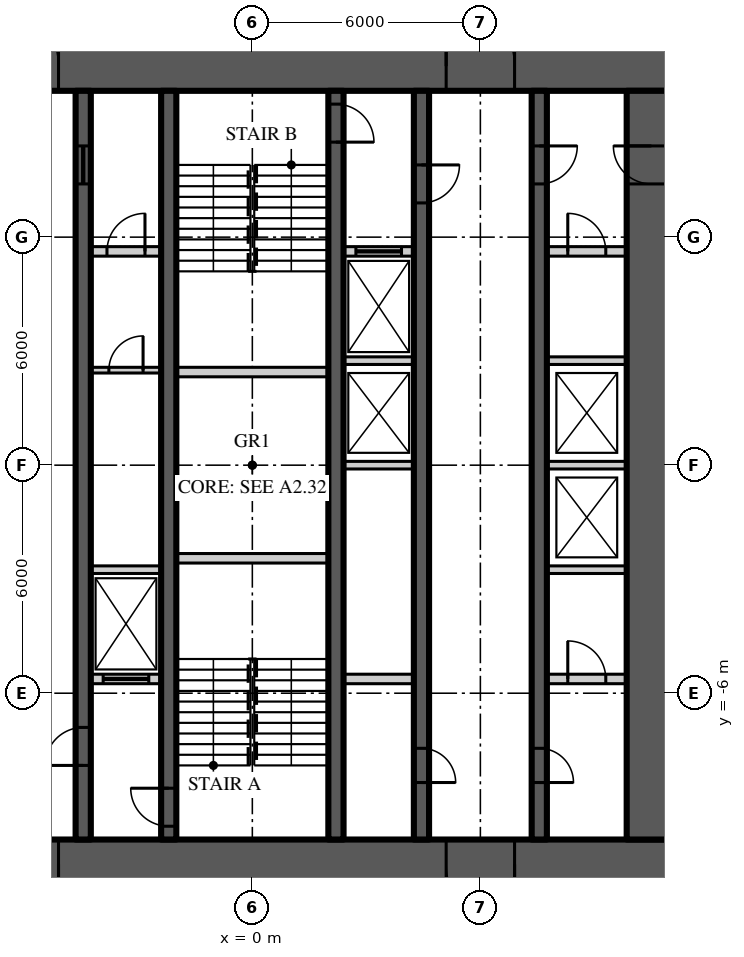
"""IFC4 building model, lengths in metres.
Left out: names, types, materials, properties, quantities, classifications, styles, units other than length and angle.
Written with IfcOpenShell. Run it as: python <this file> out.ifc"""

import sys

from ifc_helpers import new_model, si_unit, direction, frame, frame_2d, origin, place, context, subcontext, project, spatial, rectangle, extrude, element, fill, save


model = new_model("IFC4")
c1 = context("Model", 3, precision=1e-05, world=origin(), true_north=direction((0.0, 1.0)))
c2 = subcontext(c1, "Body", "Model", "MODEL_VIEW")
j1 = project(units=[si_unit("LENGTHUNIT", "METRE"), si_unit("PLANEANGLEUNIT", "RADIAN")], contexts=[c1])
p1 = place(None, origin())
s1 = spatial("IfcSite", under=j1, at=p1, CompositionType="ELEMENT")
p2 = place(p1, origin())
s2 = spatial("IfcBuilding", under=s1, at=p2, CompositionType="ELEMENT")
p3 = place(p2, frame((0.0, 0.0, 243.9)))
s3 = spatial("IfcBuildingStorey", under=s2, at=p3, CompositionType="ELEMENT", Elevation=243.9)
p4 = place(p3, frame((-11.15, 10.5, 0.0), z_axis=(0.0, 0.0, 1.0), x_axis=(1.0, 0.0, 0.0)))
e1 = element("IfcWall", 1, at=p4, inside=s3, PredefinedType="SHEAR", context=c2, shape_type="SweptSolid", body=[
    extrude(rectangle(XDim=22.3, YDim=1.3, at=frame_2d((11.15, 0.0))), origin(), (0.0, 0.0, 1.0), 3.9),
])
p5 = place(p4, frame((4.25, 0.0, 0.0)))
e2 = element("IfcOpeningElement", 2, at=p5, cuts=e1, PredefinedType="OPENING", context=c2, shape_type="SweptSolid", body=[
    extrude(rectangle(XDim=1.8, YDim=2.2, at=frame_2d((0.9, 1.1))), frame((0.0, 0.66, 0.0), z_axis=(0.0, -1.0, 0.0), x_axis=(1.0, 0.0, 0.0)), (0.0, 0.0, 1.0), 1.32),
])
p6 = place(p4, frame((16.25, 0.0, 0.0)))
e3 = element("IfcOpeningElement", 3, at=p6, cuts=e1, PredefinedType="OPENING", context=c2, shape_type="SweptSolid", body=[
    extrude(rectangle(XDim=1.8, YDim=2.2, at=frame_2d((0.9, 1.1))), frame((0.0, 0.66, 0.0), z_axis=(0.0, -1.0, 0.0), x_axis=(1.0, 0.0, 0.0)), (0.0, 0.0, 1.0), 1.32),
])
p7 = place(p3, frame((11.15, -10.5, 0.0), z_axis=(0.0, 0.0, 1.0), x_axis=(-1.0, 0.0, 0.0)))
e4 = element("IfcWall", 4, at=p7, inside=s3, PredefinedType="SHEAR", context=c2, shape_type="SweptSolid", body=[
    extrude(rectangle(XDim=22.3, YDim=1.3, at=frame_2d((11.15, 0.0))), origin(), (0.0, 0.0, 1.0), 3.9),
])
p8 = place(p7, frame((16.25, 0.0, 0.0)))
e5 = element("IfcOpeningElement", 5, at=p8, cuts=e4, PredefinedType="OPENING", context=c2, shape_type="SweptSolid", body=[
    extrude(rectangle(XDim=1.8, YDim=2.2, at=frame_2d((0.9, 1.1))), frame((0.0, 0.66, 0.0), z_axis=(0.0, -1.0, 0.0), x_axis=(1.0, 0.0, 0.0)), (0.0, 0.0, 1.0), 1.32),
])
p9 = place(p7, frame((4.25, 0.0, 0.0)))
e6 = element("IfcOpeningElement", 6, at=p9, cuts=e4, PredefinedType="OPENING", context=c2, shape_type="SweptSolid", body=[
    extrude(rectangle(XDim=1.8, YDim=2.2, at=frame_2d((0.9, 1.1))), frame((0.0, 0.66, 0.0), z_axis=(0.0, -1.0, 0.0), x_axis=(1.0, 0.0, 0.0)), (0.0, 0.0, 1.0), 1.32),
])
p10 = place(p3, frame((10.5, -9.85, 0.0), z_axis=(0.0, 0.0, 1.0), x_axis=(0.0, 1.0, 0.0)))
e7 = element("IfcWall", 7, at=p10, inside=s3, PredefinedType="SHEAR", context=c2, shape_type="SweptSolid", body=[
    extrude(rectangle(XDim=19.7, YDim=1.3, at=frame_2d((9.85, 0.0))), origin(), (0.0, 0.0, 1.0), 3.9),
])
p11 = place(p10, frame((17.25, 0.0, 0.0)))
e8 = element("IfcOpeningElement", 8, at=p11, cuts=e7, PredefinedType="OPENING", context=c2, shape_type="SweptSolid", body=[
    extrude(rectangle(XDim=1.0, YDim=2.2, at=frame_2d((0.5, 1.1))), frame((0.0, 0.66, 0.0), z_axis=(0.0, -1.0, 0.0), x_axis=(1.0, 0.0, 0.0)), (0.0, 0.0, 1.0), 1.32),
])
p12 = place(p3, frame((7.55, 9.85, 0.0), z_axis=(0.0, 0.0, 1.0), x_axis=(0.0, -1.0, 0.0)))
e9 = element("IfcWall", 9, at=p12, inside=s3, PredefinedType="SHEAR", context=c2, shape_type="SweptSolid", body=[
    extrude(rectangle(XDim=19.7, YDim=0.4, at=frame_2d((9.85, 0.0))), origin(), (0.0, 0.0, 1.0), 3.9),
])
p13 = place(p12, frame((1.45, 0.0, 0.0)))
e10 = element("IfcOpeningElement", 10, at=p13, cuts=e9, PredefinedType="OPENING", context=c2, shape_type="SweptSolid", body=[
    extrude(rectangle(XDim=1.0, YDim=2.2, at=frame_2d((0.5, 1.1))), frame((0.0, 0.21, 0.0), z_axis=(0.0, -1.0, 0.0), x_axis=(1.0, 0.0, 0.0)), (0.0, 0.0, 1.0), 0.42),
])
p14 = place(p12, frame((17.3, 0.0, 0.0)))
e11 = element("IfcOpeningElement", 11, at=p14, cuts=e9, PredefinedType="OPENING", context=c2, shape_type="SweptSolid", body=[
    extrude(rectangle(XDim=0.9, YDim=2.1, at=frame_2d((0.45, 1.05))), frame((0.0, 0.21, 0.0), z_axis=(0.0, -1.0, 0.0), x_axis=(1.0, 0.0, 0.0)), (0.0, 0.0, 1.0), 0.42),
])
p15 = place(p3, frame((-4.45, -9.85, 0.0), z_axis=(0.0, 0.0, 1.0), x_axis=(0.0, 1.0, 0.0)))
e12 = element("IfcWall", 12, at=p15, inside=s3, PredefinedType="SHEAR", context=c2, shape_type="SweptSolid", body=[
    extrude(rectangle(XDim=19.7, YDim=0.4, at=frame_2d((9.85, 0.0))), origin(), (0.0, 0.0, 1.0), 3.9),
])
p16 = place(p15, frame((1.95, 0.0, 0.0)))
e13 = element("IfcOpeningElement", 13, at=p16, cuts=e12, PredefinedType="OPENING", context=c2, shape_type="SweptSolid", body=[
    extrude(rectangle(XDim=1.0, YDim=2.2, at=frame_2d((0.5, 1.1))), frame((0.0, 0.21, 0.0), z_axis=(0.0, -1.0, 0.0), x_axis=(1.0, 0.0, 0.0)), (0.0, 0.0, 1.0), 0.42),
])
p17 = place(p15, frame((17.25, 0.0, 0.0)))
e14 = element("IfcOpeningElement", 14, at=p17, cuts=e12, PredefinedType="OPENING", context=c2, shape_type="SweptSolid", body=[
    extrude(rectangle(XDim=1.0, YDim=2.1, at=frame_2d((0.5, 1.05))), frame((0.0, 0.21, 0.0), z_axis=(0.0, -1.0, 0.0), x_axis=(1.0, 0.0, 0.0)), (0.0, 0.0, 1.0), 0.42),
])
p18 = place(p3, frame((4.45, 9.85, 0.0), z_axis=(0.0, 0.0, 1.0), x_axis=(0.0, -1.0, 0.0)))
e15 = element("IfcWall", 15, at=p18, inside=s3, PredefinedType="SHEAR", context=c2, shape_type="SweptSolid", body=[
    extrude(rectangle(XDim=19.7, YDim=0.4, at=frame_2d((9.85, 0.0))), origin(), (0.0, 0.0, 1.0), 3.9),
])
p19 = place(p18, frame((1.95, 0.0, 0.0)))
e16 = element("IfcOpeningElement", 16, at=p19, cuts=e15, PredefinedType="OPENING", context=c2, shape_type="SweptSolid", body=[
    extrude(rectangle(XDim=1.0, YDim=2.2, at=frame_2d((0.5, 1.1))), frame((0.0, 0.21, 0.0), z_axis=(0.0, -1.0, 0.0), x_axis=(1.0, 0.0, 0.0)), (0.0, 0.0, 1.0), 0.42),
])
p20 = place(p18, frame((17.3, 0.0, 0.0)))
e17 = element("IfcOpeningElement", 17, at=p20, cuts=e15, PredefinedType="OPENING", context=c2, shape_type="SweptSolid", body=[
    extrude(rectangle(XDim=0.9, YDim=2.1, at=frame_2d((0.45, 1.05))), frame((0.0, 0.21, 0.0), z_axis=(0.0, -1.0, 0.0), x_axis=(1.0, 0.0, 0.0)), (0.0, 0.0, 1.0), 0.42),
])
p21 = place(p3, frame((-2.2, -9.85, 0.0), z_axis=(0.0, 0.0, 1.0), x_axis=(0.0, 1.0, 0.0)))
e18 = element("IfcWall", 18, at=p21, inside=s3, PredefinedType="SHEAR", context=c2, shape_type="SweptSolid", body=[
    extrude(rectangle(XDim=19.7, YDim=0.4, at=frame_2d((9.85, 0.0))), origin(), (0.0, 0.0, 1.0), 3.9),
])
p22 = place(p21, frame((0.35, 0.0, 0.0)))
e19 = element("IfcOpeningElement", 19, at=p22, cuts=e18, PredefinedType="OPENING", context=c2, shape_type="SweptSolid", body=[
    extrude(rectangle(XDim=1.0, YDim=2.2, at=frame_2d((0.5, 1.1))), frame((0.0, 0.21, 0.0), z_axis=(0.0, -1.0, 0.0), x_axis=(1.0, 0.0, 0.0)), (0.0, 0.0, 1.0), 0.42),
])
p23 = place(p3, frame((2.2, 9.85, 0.0), z_axis=(0.0, 0.0, 1.0), x_axis=(0.0, -1.0, 0.0)))
e20 = element("IfcWall", 20, at=p23, inside=s3, PredefinedType="SHEAR", context=c2, shape_type="SweptSolid", body=[
    extrude(rectangle(XDim=19.7, YDim=0.4, at=frame_2d((9.85, 0.0))), origin(), (0.0, 0.0, 1.0), 3.9),
])
p24 = place(p23, frame((0.35, 0.0, 0.0)))
e21 = element("IfcOpeningElement", 21, at=p24, cuts=e20, PredefinedType="OPENING", context=c2, shape_type="SweptSolid", body=[
    extrude(rectangle(XDim=1.0, YDim=2.2, at=frame_2d((0.5, 1.1))), frame((0.0, 0.21, 0.0), z_axis=(0.0, -1.0, 0.0), x_axis=(1.0, 0.0, 0.0)), (0.0, 0.0, 1.0), 0.42),
])
p25 = place(p3, frame((-4.25, 5.625, 0.0), z_axis=(0.0, 0.0, 1.0), x_axis=(1.0, 0.0, 0.0)))
e22 = element("IfcWall", 22, at=p25, inside=s3, PredefinedType="SOLIDWALL", context=c2, shape_type="SweptSolid", body=[
    extrude(rectangle(XDim=1.85, YDim=0.25, at=frame_2d((0.925, 0.0))), origin(), (0.0, 0.0, 1.0), 3.7),
])
p26 = place(p25, frame((0.425, 0.0, 0.0)))
e23 = element("IfcOpeningElement", 23, at=p26, cuts=e22, PredefinedType="OPENING", context=c2, shape_type="SweptSolid", body=[
    extrude(rectangle(XDim=1.0, YDim=2.2, at=frame_2d((0.5, 1.1))), frame((0.0, 0.135, 0.0), z_axis=(0.0, -1.0, 0.0), x_axis=(1.0, 0.0, 0.0)), (0.0, 0.0, 1.0), 0.27),
])
p27 = place(p3, frame((2.4, 5.625, 0.0), z_axis=(0.0, 0.0, 1.0), x_axis=(1.0, 0.0, 0.0)))
e24 = element("IfcWall", 24, at=p27, inside=s3, PredefinedType="SOLIDWALL", context=c2, shape_type="SweptSolid", body=[
    extrude(rectangle(XDim=1.85, YDim=0.25, at=frame_2d((0.925, 0.0))), origin(), (0.0, 0.0, 1.0), 3.7),
])
p28 = place(p27, frame((0.325, 0.0, 0.0)))
e25 = element("IfcOpeningElement", 25, at=p28, cuts=e24, PredefinedType="OPENING", context=c2, shape_type="SweptSolid", body=[
    extrude(rectangle(XDim=1.2, YDim=2.2, at=frame_2d((0.6, 1.1))), frame((0.0, 0.135, 0.0), z_axis=(0.0, -1.0, 0.0), x_axis=(1.0, 0.0, 0.0)), (0.0, 0.0, 1.0), 0.27),
])
p29 = place(p3, frame((7.75, 5.625, 0.0), z_axis=(0.0, 0.0, 1.0), x_axis=(1.0, 0.0, 0.0)))
e26 = element("IfcWall", 26, at=p29, inside=s3, PredefinedType="SOLIDWALL", context=c2, shape_type="SweptSolid", body=[
    extrude(rectangle(XDim=2.1, YDim=0.25, at=frame_2d((1.05, 0.0))), origin(), (0.0, 0.0, 1.0), 3.7),
])
p30 = place(p29, frame((0.55, 0.0, 0.0)))
e27 = element("IfcOpeningElement", 27, at=p30, cuts=e26, PredefinedType="OPENING", context=c2, shape_type="SweptSolid", body=[
    extrude(rectangle(XDim=1.0, YDim=2.2, at=frame_2d((0.5, 1.1))), frame((0.0, 0.135, 0.0), z_axis=(0.0, -1.0, 0.0), x_axis=(1.0, 0.0, 0.0)), (0.0, 0.0, 1.0), 0.27),
])
p31 = place(p3, frame((-4.25, -5.625, 0.0), z_axis=(0.0, 0.0, 1.0), x_axis=(1.0, 0.0, 0.0)))
e28 = element("IfcWall", 28, at=p31, inside=s3, PredefinedType="SOLIDWALL", context=c2, shape_type="SweptSolid", body=[
    extrude(rectangle(XDim=1.85, YDim=0.25, at=frame_2d((0.925, 0.0))), origin(), (0.0, 0.0, 1.0), 3.7),
])
p32 = place(p31, frame((0.325, 0.0, 0.0)))
e29 = element("IfcOpeningElement", 29, at=p32, cuts=e28, PredefinedType="OPENING", context=c2, shape_type="SweptSolid", body=[
    extrude(rectangle(XDim=1.2, YDim=2.2, at=frame_2d((0.6, 1.1))), frame((0.0, 0.135, 0.0), z_axis=(0.0, -1.0, 0.0), x_axis=(1.0, 0.0, 0.0)), (0.0, 0.0, 1.0), 0.27),
])
p33 = place(p3, frame((2.4, -5.625, 0.0), z_axis=(0.0, 0.0, 1.0), x_axis=(1.0, 0.0, 0.0)))
e30 = element("IfcWall", 30, at=p33, inside=s3, PredefinedType="SOLIDWALL", context=c2, shape_type="SweptSolid", body=[
    extrude(rectangle(XDim=1.85, YDim=0.25, at=frame_2d((0.925, 0.0))), origin(), (0.0, 0.0, 1.0), 3.7),
])
p34 = place(p3, frame((7.75, -5.625, 0.0), z_axis=(0.0, 0.0, 1.0), x_axis=(1.0, 0.0, 0.0)))
e31 = element("IfcWall", 31, at=p34, inside=s3, PredefinedType="SOLIDWALL", context=c2, shape_type="SweptSolid", body=[
    extrude(rectangle(XDim=2.1, YDim=0.25, at=frame_2d((1.05, 0.0))), origin(), (0.0, 0.0, 1.0), 3.7),
])
p35 = place(p34, frame((0.55, 0.0, 0.0)))
e32 = element("IfcOpeningElement", 32, at=p35, cuts=e31, PredefinedType="OPENING", context=c2, shape_type="SweptSolid", body=[
    extrude(rectangle(XDim=1.0, YDim=2.2, at=frame_2d((0.5, 1.1))), frame((0.0, 0.135, 0.0), z_axis=(0.0, -1.0, 0.0), x_axis=(1.0, 0.0, 0.0)), (0.0, 0.0, 1.0), 0.27),
])
for number, where, z_axis, x_axis in (
    (33, (-2.0, -2.45, 0.0), (0.0, 0.0, 1.0), (1.0, 0.0, 0.0)),
    (34, (-2.0, 2.45, 0.0), (0.0, 0.0, 1.0), (1.0, 0.0, 0.0)),
):
    element("IfcWall", number, at=place(p3, frame(where, z_axis=z_axis, x_axis=x_axis)), inside=s3, PredefinedType="SOLIDWALL", context=c2, shape_type="SweptSolid", body=[
        extrude(rectangle(XDim=4.0, YDim=0.25, at=frame_2d((2.0, 0.0))), origin(), (0.0, 0.0, 1.0), 3.7),
    ])
p36 = place(p3, frame((-4.25, -2.75, 0.0), z_axis=(0.0, 0.0, 1.0), x_axis=(1.0, 0.0, 0.0)))
e35 = element("IfcWall", 35, at=p36, inside=s3, PredefinedType="SOLIDWALL", context=c2, shape_type="SweptSolid", body=[
    extrude(rectangle(XDim=1.85, YDim=0.2, at=frame_2d((0.925, 0.0))), origin(), (0.0, 0.0, 1.0), 3.7),
])
p37 = place(p3, frame((7.75, -2.75, 0.0), z_axis=(0.0, 0.0, 1.0), x_axis=(1.0, 0.0, 0.0)))
e36 = element("IfcWall", 36, at=p37, inside=s3, PredefinedType="SOLIDWALL", context=c2, shape_type="SweptSolid", body=[
    extrude(rectangle(XDim=2.1, YDim=0.2, at=frame_2d((1.05, 0.0))), origin(), (0.0, 0.0, 1.0), 3.7),
])
p38 = place(p3, frame((2.4, 0.0, 0.0), z_axis=(0.0, 0.0, 1.0), x_axis=(1.0, 0.0, 0.0)))
e37 = element("IfcWall", 37, at=p38, inside=s3, PredefinedType="SOLIDWALL", context=c2, shape_type="SweptSolid", body=[
    extrude(rectangle(XDim=1.85, YDim=0.2, at=frame_2d((0.925, 0.0))), origin(), (0.0, 0.0, 1.0), 3.7),
])
p39 = place(p3, frame((7.75, 0.0, 0.0), z_axis=(0.0, 0.0, 1.0), x_axis=(1.0, 0.0, 0.0)))
e38 = element("IfcWall", 38, at=p39, inside=s3, PredefinedType="SOLIDWALL", context=c2, shape_type="SweptSolid", body=[
    extrude(rectangle(XDim=2.1, YDim=0.2, at=frame_2d((1.05, 0.0))), origin(), (0.0, 0.0, 1.0), 3.7),
])
p40 = place(p3, frame((2.4, 2.75, 0.0), z_axis=(0.0, 0.0, 1.0), x_axis=(1.0, 0.0, 0.0)))
e39 = element("IfcWall", 39, at=p40, inside=s3, PredefinedType="SOLIDWALL", context=c2, shape_type="SweptSolid", body=[
    extrude(rectangle(XDim=1.85, YDim=0.2, at=frame_2d((0.925, 0.0))), origin(), (0.0, 0.0, 1.0), 3.7),
])
p41 = place(p3, frame((7.75, 2.75, 0.0), z_axis=(0.0, 0.0, 1.0), x_axis=(1.0, 0.0, 0.0)))
e40 = element("IfcWall", 40, at=p41, inside=s3, PredefinedType="SOLIDWALL", context=c2, shape_type="SweptSolid", body=[
    extrude(rectangle(XDim=2.1, YDim=0.2, at=frame_2d((1.05, 0.0))), origin(), (0.0, 0.0, 1.0), 3.7),
])
p42 = place(p3, frame((-4.25, 2.5, 0.0), z_axis=(0.0, 0.0, 1.0), x_axis=(1.0, 0.0, 0.0)))
e41 = element("IfcWall", 41, at=p42, inside=s3, PredefinedType="SOLIDWALL", context=c2, shape_type="SweptSolid", body=[
    extrude(rectangle(XDim=1.85, YDim=0.15, at=frame_2d((0.925, 0.0))), origin(), (0.0, 0.0, 1.0), 3.77),
])
p43 = place(p42, frame((0.475, 0.0, 0.0)))
e42 = element("IfcOpeningElement", 42, at=p43, cuts=e41, PredefinedType="OPENING", context=c2, shape_type="SweptSolid", body=[
    extrude(rectangle(XDim=0.9, YDim=2.1, at=frame_2d((0.45, 1.05))), frame((0.0, 0.085, 0.0), z_axis=(0.0, -1.0, 0.0), x_axis=(1.0, 0.0, 0.0)), (0.0, 0.0, 1.0), 0.17),
])
p44 = place(p5, origin())
e43 = element("IfcDoor", 43, at=p44, inside=s3, OperationType="DOUBLE_DOOR_DOUBLE_SWING", PredefinedType="DOOR", context=c2, shape_type="SweptSolid", body=[
    extrude(rectangle(XDim=1.8, YDim=2.2, at=frame_2d((0.9, 1.1))), frame((0.0, 0.025, 0.0), z_axis=(0.0, -1.0, 0.0), x_axis=(1.0, 0.0, 0.0)), (0.0, 0.0, 1.0), 0.05),
])
fill(e2, e43)
p45 = place(p8, origin())
e44 = element("IfcDoor", 44, at=p45, inside=s3, OperationType="DOUBLE_DOOR_DOUBLE_SWING", PredefinedType="DOOR", context=c2, shape_type="SweptSolid", body=[
    extrude(rectangle(XDim=1.8, YDim=2.2, at=frame_2d((0.9, 1.1))), frame((0.0, 0.025, 0.0), z_axis=(0.0, -1.0, 0.0), x_axis=(1.0, 0.0, 0.0)), (0.0, 0.0, 1.0), 0.05),
])
fill(e5, e44)
p46 = place(p6, origin())
e45 = element("IfcDoor", 45, at=p46, inside=s3, OperationType="DOUBLE_DOOR_DOUBLE_SWING", PredefinedType="DOOR", context=c2, shape_type="SweptSolid", body=[
    extrude(rectangle(XDim=1.8, YDim=2.2, at=frame_2d((0.9, 1.1))), frame((0.0, 0.025, 0.0), z_axis=(0.0, -1.0, 0.0), x_axis=(1.0, 0.0, 0.0)), (0.0, 0.0, 1.0), 0.05),
])
fill(e3, e45)
p47 = place(p9, origin())
e46 = element("IfcDoor", 46, at=p47, inside=s3, OperationType="DOUBLE_DOOR_DOUBLE_SWING", PredefinedType="DOOR", context=c2, shape_type="SweptSolid", body=[
    extrude(rectangle(XDim=1.8, YDim=2.2, at=frame_2d((0.9, 1.1))), frame((0.0, 0.025, 0.0), z_axis=(0.0, -1.0, 0.0), x_axis=(1.0, 0.0, 0.0)), (0.0, 0.0, 1.0), 0.05),
])
fill(e6, e46)
p48 = place(p13, origin())
e47 = element("IfcDoor", 47, at=p48, inside=s3, OperationType="SINGLE_SWING_LEFT", PredefinedType="DOOR", context=c2, shape_type="SweptSolid", body=[
    extrude(rectangle(XDim=1.0, YDim=2.2, at=frame_2d((0.5, 1.1))), frame((0.0, 0.025, 0.0), z_axis=(0.0, -1.0, 0.0), x_axis=(1.0, 0.0, 0.0)), (0.0, 0.0, 1.0), 0.05),
])
fill(e10, e47)
p49 = place(p11, origin())
e48 = element("IfcDoor", 48, at=p49, inside=s3, OperationType="SINGLE_SWING_RIGHT", PredefinedType="DOOR", context=c2, shape_type="SweptSolid", body=[
    extrude(rectangle(XDim=1.0, YDim=2.2, at=frame_2d((0.5, 1.1))), frame((0.0, 0.025, 0.0), z_axis=(0.0, -1.0, 0.0), x_axis=(1.0, 0.0, 0.0)), (0.0, 0.0, 1.0), 0.05),
])
fill(e8, e48)
p50 = place(p16, origin())
e49 = element("IfcDoor", 49, at=p50, inside=s3, OperationType="SINGLE_SWING_LEFT", PredefinedType="DOOR", context=c2, shape_type="SweptSolid", body=[
    extrude(rectangle(XDim=1.0, YDim=2.2, at=frame_2d((0.5, 1.1))), frame((0.0, 0.025, 0.0), z_axis=(0.0, -1.0, 0.0), x_axis=(1.0, 0.0, 0.0)), (0.0, 0.0, 1.0), 0.05),
])
fill(e13, e49)
p51 = place(p22, origin())
e50 = element("IfcDoor", 50, at=p51, inside=s3, OperationType="SINGLE_SWING_RIGHT", PredefinedType="DOOR", context=c2, shape_type="SweptSolid", body=[
    extrude(rectangle(XDim=1.0, YDim=2.2, at=frame_2d((0.5, 1.1))), frame((0.0, 0.025, 0.0), z_axis=(0.0, -1.0, 0.0), x_axis=(1.0, 0.0, 0.0)), (0.0, 0.0, 1.0), 0.05),
])
fill(e19, e50)
p52 = place(p19, origin())
e51 = element("IfcDoor", 51, at=p52, inside=s3, OperationType="SINGLE_SWING_LEFT", PredefinedType="DOOR", context=c2, shape_type="SweptSolid", body=[
    extrude(rectangle(XDim=1.0, YDim=2.2, at=frame_2d((0.5, 1.1))), frame((0.0, 0.025, 0.0), z_axis=(0.0, -1.0, 0.0), x_axis=(1.0, 0.0, 0.0)), (0.0, 0.0, 1.0), 0.05),
])
fill(e16, e51)
p53 = place(p24, origin())
e52 = element("IfcDoor", 52, at=p53, inside=s3, OperationType="SINGLE_SWING_RIGHT", PredefinedType="DOOR", context=c2, shape_type="SweptSolid", body=[
    extrude(rectangle(XDim=1.0, YDim=2.2, at=frame_2d((0.5, 1.1))), frame((0.0, 0.025, 0.0), z_axis=(0.0, -1.0, 0.0), x_axis=(1.0, 0.0, 0.0)), (0.0, 0.0, 1.0), 0.05),
])
fill(e21, e52)
p54 = place(p17, origin())
e53 = element("IfcDoor", 53, at=p54, inside=s3, OperationType="SLIDING_TO_LEFT", PredefinedType="DOOR", context=c2, shape_type="SweptSolid", body=[
    extrude(rectangle(XDim=1.0, YDim=2.1, at=frame_2d((0.5, 1.05))), frame((0.0, 0.025, 0.0), z_axis=(0.0, -1.0, 0.0), x_axis=(1.0, 0.0, 0.0)), (0.0, 0.0, 1.0), 0.05),
])
fill(e14, e53)
p55 = place(p14, origin())
e54 = element("IfcDoor", 54, at=p55, inside=s3, OperationType="SINGLE_SWING_RIGHT", PredefinedType="DOOR", context=c2, shape_type="SweptSolid", body=[
    extrude(rectangle(XDim=0.9, YDim=2.1, at=frame_2d((0.45, 1.05))), frame((0.0, 0.025, 0.0), z_axis=(0.0, -1.0, 0.0), x_axis=(1.0, 0.0, 0.0)), (0.0, 0.0, 1.0), 0.05),
])
fill(e11, e54)
p56 = place(p20, origin())
e55 = element("IfcDoor", 55, at=p56, inside=s3, OperationType="SINGLE_SWING_RIGHT", PredefinedType="DOOR", context=c2, shape_type="SweptSolid", body=[
    extrude(rectangle(XDim=0.9, YDim=2.1, at=frame_2d((0.45, 1.05))), frame((0.0, 0.025, 0.0), z_axis=(0.0, -1.0, 0.0), x_axis=(1.0, 0.0, 0.0)), (0.0, 0.0, 1.0), 0.05),
])
fill(e17, e55)
p57 = place(p32, origin())
e56 = element("IfcDoor", 56, at=p57, inside=s3, OperationType="SLIDING_TO_LEFT", PredefinedType="DOOR", context=c2, shape_type="SweptSolid", body=[
    extrude(rectangle(XDim=1.2, YDim=2.2, at=frame_2d((0.6, 1.1))), frame((0.0, 0.025, 0.0), z_axis=(0.0, -1.0, 0.0), x_axis=(1.0, 0.0, 0.0)), (0.0, 0.0, 1.0), 0.05),
])
fill(e29, e56)
p58 = place(p28, origin())
e57 = element("IfcDoor", 57, at=p58, inside=s3, OperationType="SLIDING_TO_LEFT", PredefinedType="DOOR", context=c2, shape_type="SweptSolid", body=[
    extrude(rectangle(XDim=1.2, YDim=2.2, at=frame_2d((0.6, 1.1))), frame((0.0, 0.025, 0.0), z_axis=(0.0, -1.0, 0.0), x_axis=(1.0, 0.0, 0.0)), (0.0, 0.0, 1.0), 0.05),
])
fill(e25, e57)
p59 = place(p43, origin())
e58 = element("IfcDoor", 58, at=p59, inside=s3, OperationType="SINGLE_SWING_RIGHT", PredefinedType="DOOR", context=c2, shape_type="SweptSolid", body=[
    extrude(rectangle(XDim=0.9, YDim=2.1, at=frame_2d((0.45, 1.05))), frame((0.0, 0.025, 0.0), z_axis=(0.0, -1.0, 0.0), x_axis=(1.0, 0.0, 0.0)), (0.0, 0.0, 1.0), 0.05),
])
fill(e42, e58)
p60 = place(p26, origin())
e59 = element("IfcDoor", 59, at=p60, inside=s3, OperationType="SINGLE_SWING_RIGHT", PredefinedType="DOOR", context=c2, shape_type="SweptSolid", body=[
    extrude(rectangle(XDim=1.0, YDim=2.2, at=frame_2d((0.5, 1.1))), frame((0.0, 0.025, 0.0), z_axis=(0.0, -1.0, 0.0), x_axis=(1.0, 0.0, 0.0)), (0.0, 0.0, 1.0), 0.05),
])
fill(e23, e59)
p61 = place(p30, origin())
e60 = element("IfcDoor", 60, at=p61, inside=s3, OperationType="SINGLE_SWING_LEFT", PredefinedType="DOOR", context=c2, shape_type="SweptSolid", body=[
    extrude(rectangle(XDim=1.0, YDim=2.2, at=frame_2d((0.5, 1.1))), frame((0.0, 0.025, 0.0), z_axis=(0.0, -1.0, 0.0), x_axis=(1.0, 0.0, 0.0)), (0.0, 0.0, 1.0), 0.05),
])
fill(e27, e60)
p62 = place(p35, origin())
e61 = element("IfcDoor", 61, at=p62, inside=s3, OperationType="SINGLE_SWING_LEFT", PredefinedType="DOOR", context=c2, shape_type="SweptSolid", body=[
    extrude(rectangle(XDim=1.0, YDim=2.2, at=frame_2d((0.5, 1.1))), frame((0.0, 0.025, 0.0), z_axis=(0.0, -1.0, 0.0), x_axis=(1.0, 0.0, 0.0)), (0.0, 0.0, 1.0), 0.05),
])
fill(e32, e61)
save(model, sys.argv[1])
